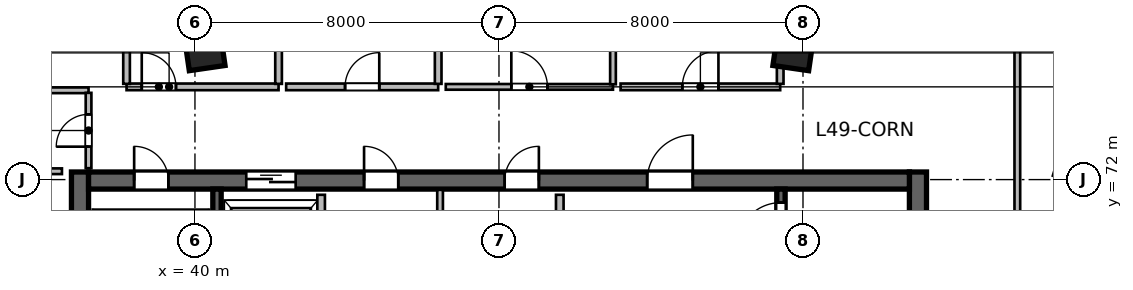
"""IFC4 building model, lengths in metres.
Left out: names, types, materials, properties, quantities, classifications, styles, units other than length and angle.
Written with IfcOpenShell. Run it as: python <this file> out.ifc"""

import sys

from ifc_helpers import new_model, si_unit, direction, frame, frame_2d, origin, origin_2d, place, context, subcontext, project, spatial, rectangle, extrude, source, transform, mapped, element, fill, save


model = new_model("IFC4")
c1 = context("Model", 3, precision=1e-05, world=origin(), true_north=direction((0.0, 1.0)))
c2 = subcontext(c1, "Body", "Model", "MODEL_VIEW")
j1 = project(units=[si_unit("LENGTHUNIT", "METRE"), si_unit("PLANEANGLEUNIT", "RADIAN")], contexts=[c1])
p1 = place(None, origin())
s1 = spatial("IfcSite", under=j1, at=p1, CompositionType="ELEMENT")
p2 = place(p1, origin())
s2 = spatial("IfcBuilding", under=s1, at=p2, CompositionType="ELEMENT")
p3 = place(p2, frame((0.0, 0.0, 204.0)))
s3 = spatial("IfcBuildingStorey", under=s2, at=p3, CompositionType="ELEMENT", Elevation=204.0)
m1 = source(origin(), c2, "Body", "SweptSolid", [
    extrude(rectangle(XDim=12.0, YDim=0.45, at=frame_2d((6.0, 0.0))), origin(), (0.0, 0.0, 1.0), 3.9),
])
for number, where, z_axis, x_axis in (
    (1, (36.975, 60.2, 0.0), (0.0, 0.0, 1.0), (0.0, 1.0, 0.0)),
    (2, (59.025, 60.2, 0.0), (0.0, 0.0, 1.0), (0.0, 1.0, 0.0)),
):
    element("IfcWall", number, at=place(p3, frame(where, z_axis=z_axis, x_axis=x_axis)), inside=s3, PredefinedType="SHEAR", context=c2, shape_type="MappedRepresentation", body=[
        mapped(m1, transform((0.0, 0.0, 0.0), scale=1.0)),
    ])
m2 = source(origin(), c2, "Body", "SweptSolid", [
    extrude(rectangle(XDim=21.6, YDim=0.45, at=frame_2d((10.8, 0.0))), origin(), (0.0, 0.0, 1.0), 3.9),
])
p4 = place(p3, frame((37.2, 71.975, 0.0), z_axis=(0.0, 0.0, 1.0), x_axis=(1.0, 0.0, 0.0)))
e3 = element("IfcWall", 3, at=p4, inside=s3, PredefinedType="SHEAR", context=c2, shape_type="MappedRepresentation", body=[
    mapped(m2, transform((0.0, 0.0, 0.0), scale=1.0)),
])
p5 = place(p4, frame((1.2, 0.0, 0.0)))
e4 = element("IfcOpeningElement", 4, at=p5, cuts=e3, PredefinedType="OPENING", context=c2, shape_type="SweptSolid", body=[
    extrude(rectangle(XDim=0.9, YDim=2.1, at=frame_2d((0.45, 1.05))), frame((0.0, 0.235, 0.0), z_axis=(0.0, -1.0, 0.0), x_axis=(1.0, 0.0, 0.0)), (0.0, 0.0, 1.0), 0.47),
])
p6 = place(p4, frame((14.7, 0.0, 0.0)))
e5 = element("IfcOpeningElement", 5, at=p6, cuts=e3, PredefinedType="OPENING", context=c2, shape_type="SweptSolid", body=[
    extrude(rectangle(XDim=1.2, YDim=2.15, at=frame_2d((0.6, 1.075))), frame((0.0, 0.235, 0.0), z_axis=(0.0, -1.0, 0.0), x_axis=(1.0, 0.0, 0.0)), (0.0, 0.0, 1.0), 0.47),
])
p7 = place(p4, frame((4.15, 0.0, 0.0)))
e6 = element("IfcOpeningElement", 6, at=p7, cuts=e3, PredefinedType="OPENING", context=c2, shape_type="SweptSolid", body=[
    extrude(rectangle(XDim=1.3, YDim=2.15, at=frame_2d((0.65, 1.075))), frame((0.0, 0.235, 0.0), z_axis=(0.0, -1.0, 0.0), x_axis=(1.0, 0.0, 0.0)), (0.0, 0.0, 1.0), 0.47),
])
p8 = place(p4, frame((7.25, 0.0, 0.0)))
e7 = element("IfcOpeningElement", 7, at=p8, cuts=e3, PredefinedType="OPENING", context=c2, shape_type="SweptSolid", body=[
    extrude(rectangle(XDim=0.9, YDim=2.1, at=frame_2d((0.45, 1.05))), frame((0.0, 0.235, 0.0), z_axis=(0.0, -1.0, 0.0), x_axis=(1.0, 0.0, 0.0)), (0.0, 0.0, 1.0), 0.47),
])
p9 = place(p4, frame((10.95, 0.0, 0.0)))
e8 = element("IfcOpeningElement", 8, at=p9, cuts=e3, PredefinedType="OPENING", context=c2, shape_type="SweptSolid", body=[
    extrude(rectangle(XDim=0.9, YDim=2.1, at=frame_2d((0.45, 1.05))), frame((0.0, 0.235, 0.0), z_axis=(0.0, -1.0, 0.0), x_axis=(1.0, 0.0, 0.0)), (0.0, 0.0, 1.0), 0.47),
])
m3 = source(origin(), c2, "Body", "SweptSolid", [
    extrude(rectangle(XDim=11.1, YDim=0.22, at=frame_2d((5.55, 0.0))), origin(), (0.0, 0.0, 1.0), 3.9),
])
p10 = place(p3, frame((40.58, 60.65, 0.0), z_axis=(0.0, 0.0, 1.0), x_axis=(0.0, 1.0, 0.0)))
e9 = element("IfcWall", 9, at=p10, inside=s3, PredefinedType="SHEAR", context=c2, shape_type="MappedRepresentation", body=[
    mapped(m3, transform((0.0, 0.0, 0.0), scale=1.0)),
])
p11 = place(p3, frame((55.42, 60.65, 0.0), z_axis=(0.0, 0.0, 1.0), x_axis=(0.0, 1.0, 0.0)))
e10 = element("IfcWall", 10, at=p11, inside=s3, PredefinedType="SHEAR", context=c2, shape_type="MappedRepresentation", body=[
    mapped(m3, transform((0.0, 0.0, 0.0), scale=1.0)),
])
p12 = place(p11, frame((9.595, 0.0, 0.0)))
e11 = element("IfcOpeningElement", 11, at=p12, cuts=e10, PredefinedType="OPENING", context=c2, shape_type="SweptSolid", body=[
    extrude(rectangle(XDim=1.15, YDim=2.15, at=frame_2d((0.575, 1.075))), frame((0.0, 0.12, 0.0), z_axis=(0.0, -1.0, 0.0), x_axis=(1.0, 0.0, 0.0)), (0.0, 0.0, 1.0), 0.24),
])
m4 = source(origin(), c2, "Body", "SweptSolid", [
    extrude(rectangle(XDim=0.95, YDim=0.95, at=origin_2d()), origin(), (0.0, 0.0, 1.0), 3.9),
])
for number, where, z_axis, x_axis in (
    (12, (40.253, 75.404, 0.0), (0.0, 0.0, 1.0), (-0.143, 0.99, 0.0)),
    (13, (55.747, 75.404, 0.0), (0.0, 0.0, 1.0), (0.143, 0.99, 0.0)),
):
    element("IfcColumn", number, at=place(p3, frame(where, z_axis=z_axis, x_axis=x_axis)), inside=s3, PredefinedType="COLUMN", context=c2, shape_type="MappedRepresentation", body=[
        mapped(m4, transform((0.0, 0.0, 0.0), scale=1.0)),
    ])
m5 = source(origin(), c2, "Body", "SweptSolid", [
    extrude(rectangle(XDim=5.8, YDim=0.2, at=frame_2d((2.9, 0.0))), origin(), (0.0, 0.0, 1.0), 3.64),
])
p13 = place(p3, frame((49.6, 65.8, 0.0), z_axis=(0.0, 0.0, 1.0), x_axis=(0.0, 1.0, 0.0)))
e14 = element("IfcWall", 14, at=p13, inside=s3, PredefinedType="SOLIDWALL", context=c2, shape_type="MappedRepresentation", body=[
    mapped(m5, transform((0.0, 0.0, 0.0), scale=1.0)),
])
m6 = source(origin(), c2, "Body", "SweptSolid", [
    extrude(rectangle(XDim=3.2, YDim=0.2, at=frame_2d((1.6, 0.0))), origin(), (0.0, 0.0, 1.0), 3.64),
])
p14 = place(p3, frame((43.32, 68.4, 0.0), z_axis=(0.0, 0.0, 1.0), x_axis=(0.0, 1.0, 0.0)))
e15 = element("IfcWall", 15, at=p14, inside=s3, PredefinedType="SOLIDWALL", context=c2, shape_type="MappedRepresentation", body=[
    mapped(m6, transform((0.0, 0.0, 0.0), scale=1.0)),
])
m7 = source(origin(), c2, "Body", "SweptSolid", [
    extrude(rectangle(XDim=3.33, YDim=0.15, at=frame_2d((1.665, 0.0))), origin(), (0.0, 0.0, 1.0), 3.64),
])
p15 = place(p3, frame((46.45, 68.4, 0.0), z_axis=(0.0, 0.0, 1.0), x_axis=(0.0, 1.0, 0.0)))
e16 = element("IfcWall", 16, at=p15, inside=s3, PredefinedType="PARTITIONING", context=c2, shape_type="MappedRepresentation", body=[
    mapped(m7, transform((0.0, 0.0, 0.0), scale=1.0)),
])
m8 = source(origin(), c2, "Body", "SweptSolid", [
    extrude(rectangle(XDim=2.1, YDim=0.15, at=frame_2d((1.05, 0.0))), origin(), (0.0, 0.0, 1.0), 3.64),
])
p16 = place(p3, frame((34.4, 72.22, 0.0), z_axis=(0.0, 0.0, 1.0), x_axis=(1.0, 0.0, 0.0)))
e17 = element("IfcWall", 17, at=p16, inside=s3, PredefinedType="PARTITIONING", context=c2, shape_type="MappedRepresentation", body=[
    mapped(m8, transform((0.0, 0.0, 0.0), scale=1.0)),
])
m9 = source(origin(), c2, "Body", "SweptSolid", [
    extrude(rectangle(XDim=2.8, YDim=0.15, at=frame_2d((1.4, 0.0))), origin(), (0.0, 0.0, 1.0), 3.64),
])
p17 = place(p3, frame((34.4, 74.35, 0.0), z_axis=(0.0, 0.0, 1.0), x_axis=(1.0, 0.0, 0.0)))
e18 = element("IfcWall", 18, at=p17, inside=s3, PredefinedType="PARTITIONING", context=c2, shape_type="MappedRepresentation", body=[
    mapped(m9, transform((0.0, 0.0, 0.0), scale=1.0)),
])
m10 = source(origin(), c2, "Body", "SweptSolid", [
    extrude(rectangle(XDim=1.982, YDim=0.15, at=frame_2d((0.991, 0.0))), origin(), (0.0, 0.0, 1.0), 3.64),
])
p18 = place(p3, frame((37.2, 72.3, 0.0), z_axis=(0.0, 0.0, 1.0), x_axis=(0.0, 1.0, 0.0)))
e19 = element("IfcWall", 19, at=p18, inside=s3, PredefinedType="PARTITIONING", context=c2, shape_type="MappedRepresentation", body=[
    mapped(m10, transform((0.0, 0.0, 0.0), scale=1.0)),
])
p19 = place(p18, frame((0.566, 0.0, 0.0)))
e20 = element("IfcOpeningElement", 20, at=p19, cuts=e19, PredefinedType="OPENING", context=c2, shape_type="SweptSolid", body=[
    extrude(rectangle(XDim=0.85, YDim=2.1, at=frame_2d((0.425, 1.05))), frame((0.0, 0.085, 0.0), z_axis=(0.0, -1.0, 0.0), x_axis=(1.0, 0.0, 0.0)), (0.0, 0.0, 1.0), 0.17),
])
m11 = source(origin(), c2, "Body", "SweptSolid", [
    extrude(rectangle(XDim=4.0, YDim=0.175, at=frame_2d((2.0, 0.0))), origin(), (0.0, 0.0, 1.0), 3.64),
])
p20 = place(p3, frame((38.2, 74.44, 0.0), z_axis=(0.0, 0.0, 1.0), x_axis=(1.0, 0.0, 0.0)))
e21 = element("IfcWall", 21, at=p20, inside=s3, PredefinedType="PARTITIONING", context=c2, shape_type="MappedRepresentation", body=[
    mapped(m11, transform((0.0, 0.0, 0.0), scale=1.0)),
])
p21 = place(p20, frame((0.4, 0.0, 0.0)))
e22 = element("IfcOpeningElement", 22, at=p21, cuts=e21, PredefinedType="OPENING", context=c2, shape_type="SweptSolid", body=[
    extrude(rectangle(XDim=0.9, YDim=2.08, at=frame_2d((0.45, 1.04))), frame((0.0, 0.098, 0.0), z_axis=(0.0, -1.0, 0.0), x_axis=(1.0, 0.0, 0.0)), (0.0, 0.0, 1.0), 0.195),
])
m12 = source(origin(), c2, "Body", "SweptSolid", [
    extrude(rectangle(XDim=2.403, YDim=0.175, at=frame_2d((1.201, 0.0))), origin(), (0.0, 0.0, 1.0), 3.64),
])
for number, where, z_axis, x_axis in (
    (23, (38.2, 74.519, 0.0), (0.0, 0.0, 1.0), (0.0, 1.0, 0.0)),
    (24, (42.2, 74.519, 0.0), (0.0, 0.0, 1.0), (0.0, 1.0, 0.0)),
):
    element("IfcWall", number, at=place(p3, frame(where, z_axis=z_axis, x_axis=x_axis)), inside=s3, PredefinedType="PARTITIONING", context=c2, shape_type="MappedRepresentation", body=[
        mapped(m12, transform((0.0, 0.0, 0.0), scale=1.0)),
    ])
p22 = place(p3, frame((42.4, 74.44, 0.0), z_axis=(0.0, 0.0, 1.0), x_axis=(1.0, 0.0, 0.0)))
e25 = element("IfcWall", 25, at=p22, inside=s3, PredefinedType="PARTITIONING", context=c2, shape_type="MappedRepresentation", body=[
    mapped(m11, transform((0.0, 0.0, 0.0), scale=1.0)),
])
p23 = place(p22, frame((1.55, 0.0, 0.0)))
e26 = element("IfcOpeningElement", 26, at=p23, cuts=e25, PredefinedType="OPENING", context=c2, shape_type="SweptSolid", body=[
    extrude(rectangle(XDim=0.9, YDim=2.08, at=frame_2d((0.45, 1.04))), frame((0.0, 0.098, 0.0), z_axis=(0.0, -1.0, 0.0), x_axis=(1.0, 0.0, 0.0)), (0.0, 0.0, 1.0), 0.195),
])
p24 = place(p3, frame((46.4, 74.519, 0.0), z_axis=(0.0, 0.0, 1.0), x_axis=(0.0, 1.0, 0.0)))
e27 = element("IfcWall", 27, at=p24, inside=s3, PredefinedType="PARTITIONING", context=c2, shape_type="MappedRepresentation", body=[
    mapped(m12, transform((0.0, 0.0, 0.0), scale=1.0)),
])
m13 = source(origin(), c2, "Body", "SweptSolid", [
    extrude(rectangle(XDim=4.4, YDim=0.15, at=frame_2d((2.2, 0.0))), origin(), (0.0, 0.0, 1.0), 3.64),
])
p25 = place(p3, frame((46.6, 74.44, 0.0), z_axis=(0.0, 0.0, 1.0), x_axis=(1.0, 0.0, 0.0)))
e28 = element("IfcWall", 28, at=p25, inside=s3, PredefinedType="PARTITIONING", context=c2, shape_type="MappedRepresentation", body=[
    mapped(m13, transform((0.0, 0.0, 0.0), scale=1.0)),
])
p26 = place(p25, frame((1.725, 0.0, 0.0)))
e29 = element("IfcOpeningElement", 29, at=p26, cuts=e28, PredefinedType="OPENING", context=c2, shape_type="SweptSolid", body=[
    extrude(rectangle(XDim=0.95, YDim=2.1, at=frame_2d((0.475, 1.05))), frame((0.0, 0.085, 0.0), z_axis=(0.0, -1.0, 0.0), x_axis=(1.0, 0.0, 0.0)), (0.0, 0.0, 1.0), 0.17),
])
m14 = source(origin(), c2, "Body", "SweptSolid", [
    extrude(rectangle(XDim=2.425, YDim=0.15, at=frame_2d((1.212, 0.0))), origin(), (0.0, 0.0, 1.0), 3.64),
])
p27 = place(p3, frame((51.0, 74.508, 0.0), z_axis=(0.0, 0.0, 1.0), x_axis=(0.0, 1.0, 0.0)))
e30 = element("IfcWall", 30, at=p27, inside=s3, PredefinedType="PARTITIONING", context=c2, shape_type="MappedRepresentation", body=[
    mapped(m14, transform((0.0, 0.0, 0.0), scale=1.0)),
])
m15 = source(origin(), c2, "Body", "SweptSolid", [
    extrude(rectangle(XDim=4.2, YDim=0.175, at=frame_2d((2.1, 0.0))), origin(), (0.0, 0.0, 1.0), 3.64),
])
p28 = place(p3, frame((51.2, 74.44, 0.0), z_axis=(0.0, 0.0, 1.0), x_axis=(1.0, 0.0, 0.0)))
e31 = element("IfcWall", 31, at=p28, inside=s3, PredefinedType="PARTITIONING", context=c2, shape_type="MappedRepresentation", body=[
    mapped(m15, transform((0.0, 0.0, 0.0), scale=1.0)),
])
p29 = place(p28, frame((1.625, 0.0, 0.0)))
e32 = element("IfcOpeningElement", 32, at=p29, cuts=e31, PredefinedType="OPENING", context=c2, shape_type="SweptSolid", body=[
    extrude(rectangle(XDim=0.95, YDim=2.12, at=frame_2d((0.475, 1.06))), frame((0.0, 0.098, 0.0), z_axis=(0.0, -1.0, 0.0), x_axis=(1.0, 0.0, 0.0)), (0.0, 0.0, 1.0), 0.195),
])
p30 = place(p3, frame((55.4, 74.519, 0.0), z_axis=(0.0, 0.0, 1.0), x_axis=(0.0, 1.0, 0.0)))
e33 = element("IfcWall", 33, at=p30, inside=s3, PredefinedType="PARTITIONING", context=c2, shape_type="MappedRepresentation", body=[
    mapped(m12, transform((0.0, 0.0, 0.0), scale=1.0)),
])
m16 = source(origin(), c2, "Body", "SweptSolid", [
    extrude(rectangle(XDim=19.209, YDim=0.15, at=frame_2d((9.604, 0.0))), origin(), (0.0, 0.0, 1.0), 3.64),
])
p31 = place(p3, frame((61.64, 57.96, 0.0), z_axis=(0.0, 0.0, 1.0), x_axis=(0.0, 1.0, 0.0)))
e34 = element("IfcWall", 34, at=p31, inside=s3, PredefinedType="PARTITIONING", context=c2, shape_type="MappedRepresentation", body=[
    mapped(m16, transform((0.0, 0.0, 0.0), scale=1.0)),
])
p32 = place(p31, frame((6.824, 0.0, 0.0)))
e35 = element("IfcOpeningElement", 35, at=p32, cuts=e34, PredefinedType="OPENING", context=c2, shape_type="SweptSolid", body=[
    extrude(rectangle(XDim=0.95, YDim=2.1, at=frame_2d((0.475, 1.05))), frame((0.0, 0.085, 0.0), z_axis=(0.0, -1.0, 0.0), x_axis=(1.0, 0.0, 0.0)), (0.0, 0.0, 1.0), 0.17),
])
m17 = source(origin(), c2, "Body", "SweptSolid", [
    extrude(rectangle(XDim=0.9, YDim=2.1, at=frame_2d((0.45, 1.05))), frame((0.0, 0.025, 0.0), z_axis=(0.0, -1.0, 0.0), x_axis=(1.0, 0.0, 0.0)), (0.0, 0.0, 1.0), 0.05),
])
p33 = place(p5, origin())
e36 = element("IfcDoor", 36, at=p33, inside=s3, OperationType="SINGLE_SWING_LEFT", PredefinedType="DOOR", context=c2, shape_type="MappedRepresentation", body=[
    mapped(m17, transform((0.0, 0.0, 0.0), scale=1.0)),
])
fill(e4, e36)
m18 = source(origin(), c2, "Body", "SweptSolid", [
    extrude(rectangle(XDim=1.15, YDim=2.15, at=frame_2d((0.575, 1.075))), frame((0.0, 0.025, 0.0), z_axis=(0.0, -1.0, 0.0), x_axis=(1.0, 0.0, 0.0)), (0.0, 0.0, 1.0), 0.05),
])
p34 = place(p12, origin())
e37 = element("IfcDoor", 37, at=p34, inside=s3, OperationType="SINGLE_SWING_LEFT", PredefinedType="DOOR", context=c2, shape_type="MappedRepresentation", body=[
    mapped(m18, transform((0.0, 0.0, 0.0), scale=1.0)),
])
fill(e11, e37)
m19 = source(origin(), c2, "Body", "SweptSolid", [
    extrude(rectangle(XDim=1.2, YDim=2.15, at=frame_2d((0.6, 1.075))), frame((0.0, 0.025, 0.0), z_axis=(0.0, -1.0, 0.0), x_axis=(1.0, 0.0, 0.0)), (0.0, 0.0, 1.0), 0.05),
])
p35 = place(p6, origin())
e38 = element("IfcDoor", 38, at=p35, inside=s3, OperationType="SINGLE_SWING_RIGHT", PredefinedType="DOOR", context=c2, shape_type="MappedRepresentation", body=[
    mapped(m19, transform((0.0, 0.0, 0.0), scale=1.0)),
])
fill(e5, e38)
m20 = source(origin(), c2, "Body", "SweptSolid", [
    extrude(rectangle(XDim=1.3, YDim=2.15, at=frame_2d((0.65, 1.075))), frame((0.0, 0.025, 0.0), z_axis=(0.0, -1.0, 0.0), x_axis=(1.0, 0.0, 0.0)), (0.0, 0.0, 1.0), 0.05),
])
p36 = place(p7, origin())
e39 = element("IfcDoor", 39, at=p36, inside=s3, OperationType="DOUBLE_DOOR_SLIDING", PredefinedType="DOOR", context=c2, shape_type="MappedRepresentation", body=[
    mapped(m20, transform((0.0, 0.0, 0.0), scale=1.0)),
])
fill(e6, e39)
p37 = place(p8, origin())
e40 = element("IfcDoor", 40, at=p37, inside=s3, OperationType="SINGLE_SWING_LEFT", PredefinedType="DOOR", context=c2, shape_type="MappedRepresentation", body=[
    mapped(m17, transform((0.0, 0.0, 0.0), scale=1.0)),
])
fill(e7, e40)
p38 = place(p9, origin())
e41 = element("IfcDoor", 41, at=p38, inside=s3, OperationType="SINGLE_SWING_RIGHT", PredefinedType="DOOR", context=c2, shape_type="MappedRepresentation", body=[
    mapped(m17, transform((0.0, 0.0, 0.0), scale=1.0)),
])
fill(e8, e41)
m21 = source(origin(), c2, "Body", "SweptSolid", [
    extrude(rectangle(XDim=0.85, YDim=2.1, at=frame_2d((0.425, 1.05))), frame((0.0, 0.025, 0.0), z_axis=(0.0, -1.0, 0.0), x_axis=(1.0, 0.0, 0.0)), (0.0, 0.0, 1.0), 0.05),
])
p39 = place(p19, origin())
e42 = element("IfcDoor", 42, at=p39, inside=s3, OperationType="SINGLE_SWING_LEFT", PredefinedType="DOOR", context=c2, shape_type="MappedRepresentation", body=[
    mapped(m21, transform((0.0, 0.0, 0.0), scale=1.0)),
])
fill(e20, e42)
m22 = source(origin(), c2, "Body", "SweptSolid", [
    extrude(rectangle(XDim=0.9, YDim=2.08, at=frame_2d((0.45, 1.04))), frame((0.0, 0.025, 0.0), z_axis=(0.0, -1.0, 0.0), x_axis=(1.0, 0.0, 0.0)), (0.0, 0.0, 1.0), 0.05),
])
p40 = place(p21, origin())
e43 = element("IfcDoor", 43, at=p40, inside=s3, OperationType="SINGLE_SWING_LEFT", PredefinedType="DOOR", context=c2, shape_type="MappedRepresentation", body=[
    mapped(m22, transform((0.0, 0.0, 0.0), scale=1.0)),
])
fill(e22, e43)
p41 = place(p23, origin())
e44 = element("IfcDoor", 44, at=p41, inside=s3, OperationType="SINGLE_SWING_RIGHT", PredefinedType="DOOR", context=c2, shape_type="MappedRepresentation", body=[
    mapped(m22, transform((0.0, 0.0, 0.0), scale=1.0)),
])
fill(e26, e44)
m23 = source(origin(), c2, "Body", "SweptSolid", [
    extrude(rectangle(XDim=0.95, YDim=2.1, at=frame_2d((0.475, 1.05))), frame((0.0, 0.025, 0.0), z_axis=(0.0, -1.0, 0.0), x_axis=(1.0, 0.0, 0.0)), (0.0, 0.0, 1.0), 0.05),
])
p42 = place(p26, origin())
e45 = element("IfcDoor", 45, at=p42, inside=s3, OperationType="SINGLE_SWING_LEFT", PredefinedType="DOOR", context=c2, shape_type="MappedRepresentation", body=[
    mapped(m23, transform((0.0, 0.0, 0.0), scale=1.0)),
])
fill(e29, e45)
m24 = source(origin(), c2, "Body", "SweptSolid", [
    extrude(rectangle(XDim=0.95, YDim=2.12, at=frame_2d((0.475, 1.06))), frame((0.0, 0.025, 0.0), z_axis=(0.0, -1.0, 0.0), x_axis=(1.0, 0.0, 0.0)), (0.0, 0.0, 1.0), 0.05),
])
p43 = place(p29, origin())
e46 = element("IfcDoor", 46, at=p43, inside=s3, OperationType="SINGLE_SWING_RIGHT", PredefinedType="DOOR", context=c2, shape_type="MappedRepresentation", body=[
    mapped(m24, transform((0.0, 0.0, 0.0), scale=1.0)),
])
fill(e32, e46)
save(model, sys.argv[1])
